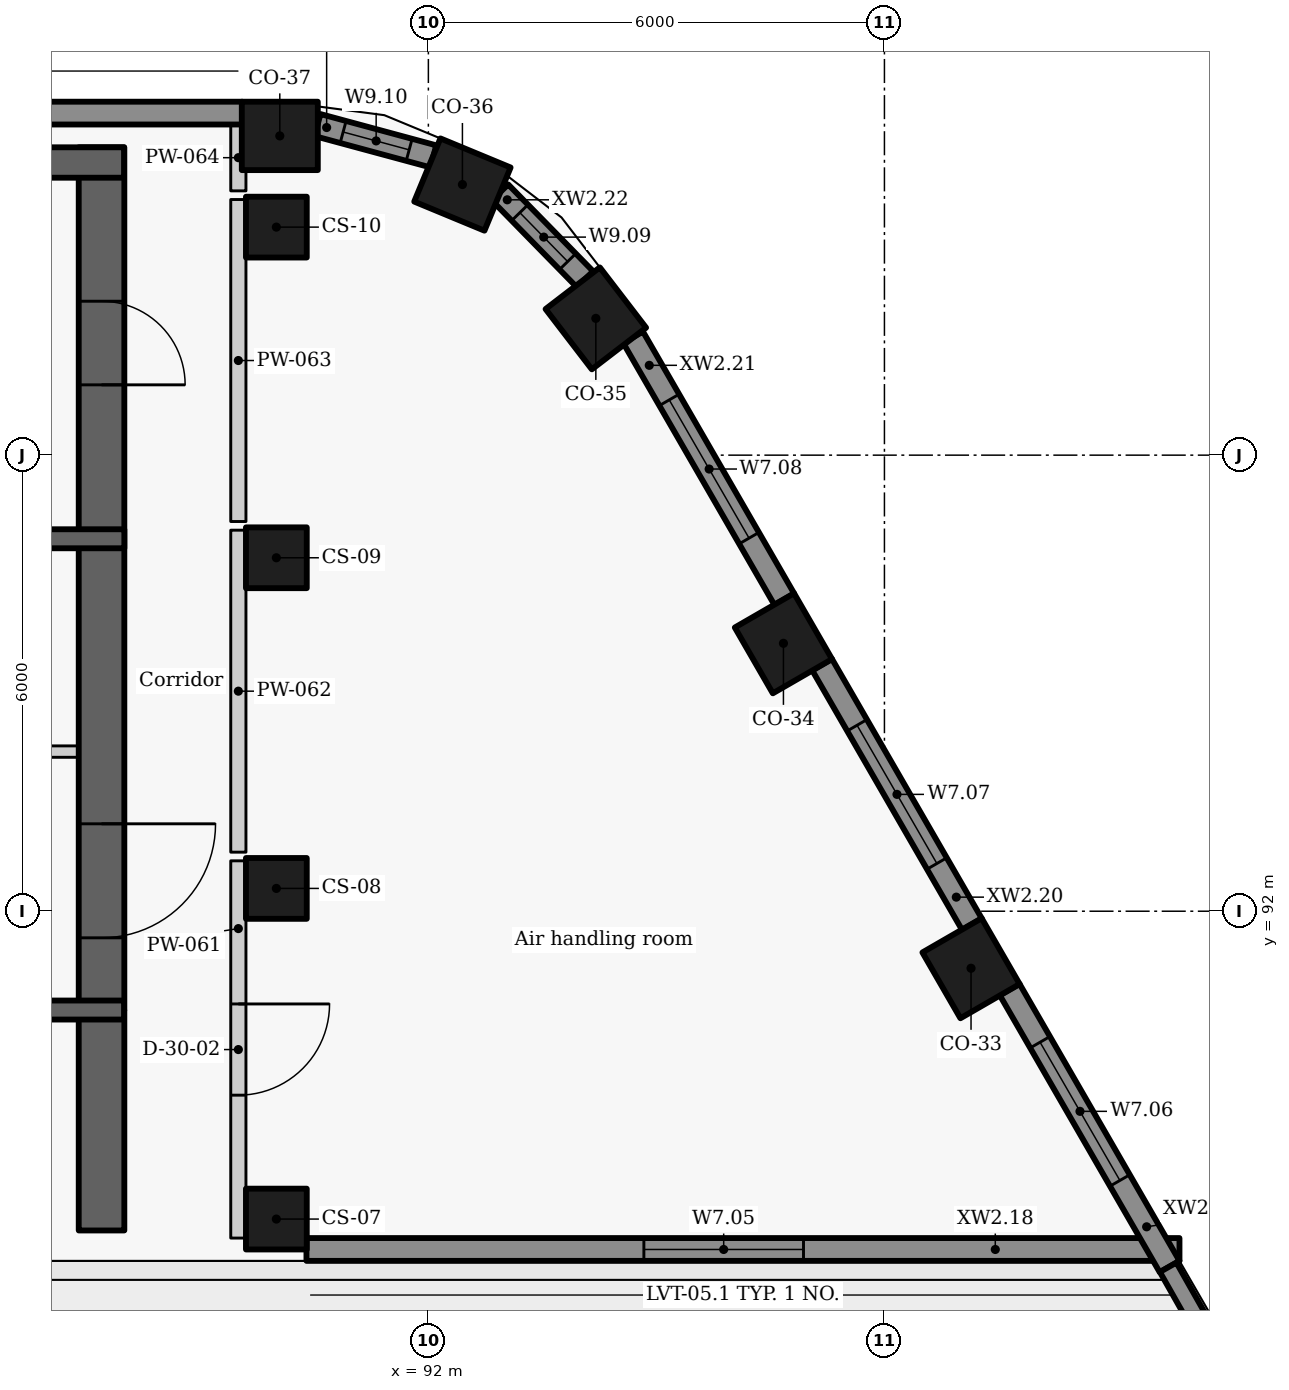
"""IFC4 building model, lengths in metres.
Left out: names, types, materials, properties, quantities, classifications, styles, units other than length and angle.
Written with IfcOpenShell. Run it as: python <this file> out.ifc"""

import sys

from ifc_helpers import new_model, si_unit, direction, frame, frame_2d, origin, origin_2d, place, context, subcontext, project, spatial, rectangle, extrude, element, fill, save


model = new_model("IFC4")
c1 = context("Model", 3, precision=1e-05, world=origin(), true_north=direction((0.0, 1.0)))
c2 = subcontext(c1, "Body", "Model", "MODEL_VIEW")
j1 = project(units=[si_unit("LENGTHUNIT", "METRE"), si_unit("PLANEANGLEUNIT", "RADIAN")], contexts=[c1])
p1 = place(None, origin())
s1 = spatial("IfcSite", under=j1, at=p1, CompositionType="ELEMENT")
p2 = place(p1, origin())
s2 = spatial("IfcBuilding", under=s1, at=p2, CompositionType="ELEMENT")
p3 = place(p2, frame((0.0, 0.0, 276.0)))
s3 = spatial("IfcBuildingStorey", under=s2, at=p3, CompositionType="ELEMENT", Elevation=276.0)
for number, where, z_axis, x_axis in (
    (1, (99.139, 91.25, 0.0), (0.0, 0.0, 1.0), (-0.5, 0.866, 0.0)),
    (2, (96.671, 95.525, 0.0), (0.0, 0.0, 1.0), (-0.5, 0.866, 0.0)),
    (3, (94.203, 99.8, 0.0), (0.0, 0.0, 1.0), (-0.609, 0.793, 0.0)),
    (4, (92.448, 101.56, 0.0), (0.0, 0.0, 1.0), (-0.924, 0.383, 0.0)),
    (5, (90.045, 102.2, 0.0), (0.0, 0.0, 1.0), (-1.0, 0.0, 0.0)),
):
    element("IfcColumn", number, at=place(p3, frame(where, z_axis=z_axis, x_axis=x_axis)), inside=s3, PredefinedType="COLUMN", context=c2, shape_type="SweptSolid", body=[
        extrude(rectangle(XDim=1.0, YDim=0.9, at=origin_2d()), origin(), (0.0, 0.0, 1.0), 3.6),
    ])
for number, where, z_axis, x_axis in (
    (6, (90.0, 87.95, 0.0), (0.0, 0.0, 1.0), (0.0, 1.0, 0.0)),
    (7, (90.0, 92.3, 0.0), (0.0, 0.0, 1.0), (0.0, 1.0, 0.0)),
    (8, (90.0, 96.65, 0.0), (0.0, 0.0, 1.0), (0.0, 1.0, 0.0)),
    (9, (90.0, 101.0, 0.0), (0.0, 0.0, 1.0), (0.0, 1.0, 0.0)),
):
    element("IfcColumn", number, at=place(p3, frame(where, z_axis=z_axis, x_axis=x_axis)), inside=s3, PredefinedType="COLUMN", context=c2, shape_type="SweptSolid", body=[
        extrude(rectangle(XDim=0.8, YDim=0.8, at=origin_2d()), origin(), (0.0, 0.0, 1.0), 3.6),
    ])
p4 = place(p3, frame((90.396, 87.55, 0.0), z_axis=(0.0, 0.0, 1.0), x_axis=(1.0, 0.0, 0.0)))
e10 = element("IfcWall", 10, at=p4, inside=s3, PredefinedType="SOLIDWALL", context=c2, shape_type="SweptSolid", body=[
    extrude(rectangle(XDim=11.486, YDim=0.3, at=frame_2d((5.743, 0.0))), origin(), (0.0, 0.0, 1.0), 2.725),
])
p5 = place(p4, frame((4.439, 0.0, 0.9)))
e11 = element("IfcOpeningElement", 11, at=p5, cuts=e10, PredefinedType="OPENING", context=c2, shape_type="SweptSolid", body=[
    extrude(rectangle(XDim=2.1, YDim=1.1, at=frame_2d((1.05, 0.55))), frame((0.0, 0.16, 0.0), z_axis=(0.0, -1.0, 0.0), x_axis=(1.0, 0.0, 0.0)), (0.0, 0.0, 1.0), 0.32),
])
p6 = place(p3, frame((101.752, 87.325, 0.0), z_axis=(0.0, 0.0, 1.0), x_axis=(-0.499981865284, 0.866035873614, 0.0)))
e12 = element("IfcWall", 12, at=p6, inside=s3, PredefinedType="SOLIDWALL", context=c2, shape_type="SweptSolid", body=[
    extrude(rectangle(XDim=4.209, YDim=0.3, at=frame_2d((2.104, 0.0))), origin(), (0.0, 0.0, 1.0), 2.725),
])
p7 = place(p6, frame((1.308, 0.0, 0.9)))
e13 = element("IfcOpeningElement", 13, at=p7, cuts=e12, PredefinedType="OPENING", context=c2, shape_type="SweptSolid", body=[
    extrude(rectangle(XDim=2.1, YDim=1.1, at=frame_2d((1.05, 0.55))), frame((0.0, 0.16, 0.0), z_axis=(0.0, -1.0, 0.0), x_axis=(1.0, 0.0, 0.0)), (0.0, 0.0, 1.0), 0.32),
])
p8 = place(p3, frame((99.151, 91.829, 0.0), z_axis=(0.0, 0.0, 1.0), x_axis=(-0.499986771468, 0.866033041146, 0.0)))
e14 = element("IfcWall", 14, at=p8, inside=s3, PredefinedType="SOLIDWALL", context=c2, shape_type="SweptSolid", body=[
    extrude(rectangle(XDim=3.944, YDim=0.3, at=frame_2d((1.972, 0.0))), origin(), (0.0, 0.0, 1.0), 2.725),
])
p9 = place(p8, frame((0.922, 0.0, 0.9)))
e15 = element("IfcOpeningElement", 15, at=p9, cuts=e14, PredefinedType="OPENING", context=c2, shape_type="SweptSolid", body=[
    extrude(rectangle(XDim=2.1, YDim=1.1, at=frame_2d((1.05, 0.55))), frame((0.0, 0.16, 0.0), z_axis=(0.0, -1.0, 0.0), x_axis=(1.0, 0.0, 0.0)), (0.0, 0.0, 1.0), 0.32),
])
p10 = place(p3, frame((96.683, 96.104, 0.0), z_axis=(0.0, 0.0, 1.0), x_axis=(-0.500005687176, 0.866022120267, 0.0)))
e16 = element("IfcWall", 16, at=p10, inside=s3, PredefinedType="SOLIDWALL", context=c2, shape_type="SweptSolid", body=[
    extrude(rectangle(XDim=3.979, YDim=0.3, at=frame_2d((1.99, 0.0))), origin(), (0.0, 0.0, 1.0), 2.725),
])
p11 = place(p10, frame((0.928, 0.0, 0.9)))
e17 = element("IfcOpeningElement", 17, at=p11, cuts=e16, PredefinedType="OPENING", context=c2, shape_type="SweptSolid", body=[
    extrude(rectangle(XDim=2.1, YDim=1.1, at=frame_2d((1.05, 0.55))), frame((0.0, 0.16, 0.0), z_axis=(0.0, -1.0, 0.0), x_axis=(1.0, 0.0, 0.0)), (0.0, 0.0, 1.0), 0.32),
])
p12 = place(p3, frame((94.06, 100.315, 0.0), z_axis=(0.0, 0.0, 1.0), x_axis=(-0.6992720923, 0.714855608449, 0.0)))
e18 = element("IfcWall", 18, at=p12, inside=s3, PredefinedType="SOLIDWALL", context=c2, shape_type="SweptSolid", body=[
    extrude(rectangle(XDim=1.598, YDim=0.3, at=frame_2d((0.799, 0.0))), origin(), (0.0, 0.0, 1.0), 2.725),
])
p13 = place(p12, frame((0.325, 0.0, 0.9)))
e19 = element("IfcOpeningElement", 19, at=p13, cuts=e18, PredefinedType="OPENING", context=c2, shape_type="SweptSolid", body=[
    extrude(rectangle(XDim=0.9, YDim=1.1, at=frame_2d((0.45, 0.55))), frame((0.0, 0.16, 0.0), z_axis=(0.0, -1.0, 0.0), x_axis=(1.0, 0.0, 0.0)), (0.0, 0.0, 1.0), 0.32),
])
p14 = place(p3, frame((92.065, 101.931, 0.0), z_axis=(0.0, 0.0, 1.0), x_axis=(-0.965371819036, 0.260877846914, 0.0)))
e20 = element("IfcWall", 20, at=p14, inside=s3, PredefinedType="SOLIDWALL", context=c2, shape_type="SweptSolid", body=[
    extrude(rectangle(XDim=1.578, YDim=0.3, at=frame_2d((0.789, 0.0))), origin(), (0.0, 0.0, 1.0), 2.725),
])
p15 = place(p14, frame((0.329, 0.0, 0.9)))
e21 = element("IfcOpeningElement", 21, at=p15, cuts=e20, PredefinedType="OPENING", context=c2, shape_type="SweptSolid", body=[
    extrude(rectangle(XDim=0.9, YDim=1.1, at=frame_2d((0.45, 0.55))), frame((0.0, 0.16, 0.0), z_axis=(0.0, -1.0, 0.0), x_axis=(1.0, 0.0, 0.0)), (0.0, 0.0, 1.0), 0.32),
])
p16 = place(p3, frame((89.549, 102.5, 0.0), z_axis=(0.0, 0.0, 1.0), x_axis=(-1.0, 0.0, 0.0)))
e22 = element("IfcWall", 22, at=p16, inside=s3, PredefinedType="SOLIDWALL", context=c2, shape_type="SweptSolid", body=[
    extrude(rectangle(XDim=19.134, YDim=0.3, at=frame_2d((9.567, 0.0))), origin(), (0.0, 0.0, 1.0), 2.725),
])
p17 = place(p3, frame((104.649, 82.166, 0.0), z_axis=(0.0, 0.0, 1.0), x_axis=(-0.492736734633, 0.870178435922, 0.0)))
e23 = element("IfcWall", 23, at=p17, inside=s3, PredefinedType="PARAPET", context=c2, shape_type="SweptSolid", body=[
    extrude(rectangle(XDim=5.918, YDim=0.25, at=frame_2d((2.959, 0.0))), origin(), (0.0, 0.0, 1.0), 1.1),
])
p18 = place(p3, frame((85.397, 94.1, 0.0), z_axis=(0.0, 0.0, 1.0), x_axis=(1.0, 0.0, 0.0)))
e24 = element("IfcWall", 24, at=p18, inside=s3, PredefinedType="PARTITIONING", context=c2, shape_type="SweptSolid", body=[
    extrude(rectangle(XDim=2.603, YDim=0.15, at=frame_2d((1.302, 0.0))), origin(), (0.0, 0.0, 1.0), 3.325),
])
p19 = place(p18, frame((0.528, 0.0, 0.0)))
e25 = element("IfcOpeningElement", 25, at=p19, cuts=e24, PredefinedType="OPENING", context=c2, shape_type="SweptSolid", body=[
    extrude(rectangle(XDim=0.9, YDim=2.1, at=frame_2d((0.45, 1.05))), frame((0.0, 0.085, 0.0), z_axis=(0.0, -1.0, 0.0), x_axis=(1.0, 0.0, 0.0)), (0.0, 0.0, 1.0), 0.17),
])
p20 = place(p3, frame((87.7, 102.05, -0.275), z_axis=(0.0, 0.0, 1.0), x_axis=(0.0, -1.0, 0.0)))
e26 = element("IfcWall", 26, at=p20, inside=s3, PredefinedType="SHEAR", context=c2, shape_type="SweptSolid", body=[
    extrude(rectangle(XDim=11.35, YDim=0.6, at=frame_2d((5.675, 0.0))), origin(), (0.0, 0.0, 1.0), 3.6),
])
p21 = place(p20, frame((8.9, 0.0, 0.275)))
e27 = element("IfcOpeningElement", 27, at=p21, cuts=e26, PredefinedType="OPENING", context=c2, shape_type="SweptSolid", body=[
    extrude(rectangle(XDim=1.5, YDim=2.1, at=frame_2d((0.75, 1.05))), frame((0.0, 0.31, 0.0), z_axis=(0.0, -1.0, 0.0), x_axis=(1.0, 0.0, 0.0)), (0.0, 0.0, 1.0), 0.62),
])
p22 = place(p20, frame((2.025, 0.0, 0.275)))
e28 = element("IfcOpeningElement", 28, at=p22, cuts=e26, PredefinedType="OPENING", context=c2, shape_type="SweptSolid", body=[
    extrude(rectangle(XDim=1.1, YDim=2.1, at=frame_2d((0.55, 1.05))), frame((0.0, 0.31, 0.0), z_axis=(0.0, -1.0, 0.0), x_axis=(1.0, 0.0, 0.0)), (0.0, 0.0, 1.0), 0.62),
])
p23 = place(p3, frame((80.547, 96.9, -0.275), z_axis=(0.0, 0.0, 1.0), x_axis=(1.0, 0.0, 0.0)))
e29 = element("IfcWall", 29, at=p23, inside=s3, PredefinedType="SHEAR", context=c2, shape_type="SweptSolid", body=[
    extrude(rectangle(XDim=7.453, YDim=0.25, at=frame_2d((3.727, 0.0))), origin(), (0.0, 0.0, 1.0), 3.6),
])
p24 = place(p23, frame((3.302, 0.0, 0.275)))
e30 = element("IfcOpeningElement", 30, at=p24, cuts=e29, PredefinedType="OPENING", context=c2, shape_type="SweptSolid", body=[
    extrude(rectangle(XDim=1.1, YDim=2.1, at=frame_2d((0.55, 1.05))), frame((0.0, 0.135, 0.0), z_axis=(0.0, -1.0, 0.0), x_axis=(1.0, 0.0, 0.0)), (0.0, 0.0, 1.0), 0.27),
])
p25 = place(p3, frame((89.5, 92.663, 0.0), z_axis=(0.0, 0.0, 1.0), x_axis=(0.0, -1.0, 0.0)))
e31 = element("IfcWall", 31, at=p25, inside=s3, PredefinedType="PARTITIONING", context=c2, shape_type="SweptSolid", body=[
    extrude(rectangle(XDim=4.963, YDim=0.2, at=frame_2d((2.481, 0.0))), origin(), (0.0, 0.0, 1.0), 3.325),
])
p26 = place(p25, frame((1.883, 0.0, 0.0)))
e32 = element("IfcOpeningElement", 32, at=p26, cuts=e31, PredefinedType="OPENING", context=c2, shape_type="SweptSolid", body=[
    extrude(rectangle(XDim=1.2, YDim=2.1, at=frame_2d((0.6, 1.05))), frame((0.0, 0.11, 0.0), z_axis=(0.0, -1.0, 0.0), x_axis=(1.0, 0.0, 0.0)), (0.0, 0.0, 1.0), 0.22),
])
p27 = place(p3, frame((89.5, 92.777, 0.0), z_axis=(0.0, 0.0, 1.0), x_axis=(0.0, 1.0, 0.0)))
e33 = element("IfcWall", 33, at=p27, inside=s3, PredefinedType="PARTITIONING", context=c2, shape_type="SweptSolid", body=[
    extrude(rectangle(XDim=4.236, YDim=0.2, at=frame_2d((2.118, 0.0))), origin(), (0.0, 0.0, 1.0), 3.325),
])
p28 = place(p3, frame((89.5, 97.127, 0.0), z_axis=(0.0, 0.0, 1.0), x_axis=(0.0, 1.0, 0.0)))
e34 = element("IfcWall", 34, at=p28, inside=s3, PredefinedType="PARTITIONING", context=c2, shape_type="SweptSolid", body=[
    extrude(rectangle(XDim=4.236, YDim=0.2, at=frame_2d((2.118, 0.0))), origin(), (0.0, 0.0, 1.0), 3.325),
])
p29 = place(p3, frame((89.5, 101.477, 0.0), z_axis=(0.0, 0.0, 1.0), x_axis=(0.0, 1.0, 0.0)))
e35 = element("IfcWall", 35, at=p29, inside=s3, PredefinedType="PARTITIONING", context=c2, shape_type="SweptSolid", body=[
    extrude(rectangle(XDim=0.873, YDim=0.2, at=frame_2d((0.437, 0.0))), origin(), (0.0, 0.0, 1.0), 3.325),
])
p30 = place(p3, frame((87.7, 87.8, -0.275), z_axis=(0.0, 0.0, 1.0), x_axis=(0.0, 1.0, 0.0)))
e36 = element("IfcWall", 36, at=p30, inside=s3, PredefinedType="SHEAR", context=c2, shape_type="SweptSolid", body=[
    extrude(rectangle(XDim=2.896, YDim=0.6, at=frame_2d((1.448, 0.0))), origin(), (0.0, 0.0, 1.0), 3.6),
])
p31 = place(p3, frame((85.404, 90.7, -0.275), z_axis=(0.0, 0.0, 1.0), x_axis=(1.0, 0.0, 0.0)))
e37 = element("IfcWall", 37, at=p31, inside=s3, PredefinedType="SHEAR", context=c2, shape_type="SweptSolid", body=[
    extrude(rectangle(XDim=2.592, YDim=0.25, at=frame_2d((1.296, 0.0))), origin(), (0.0, 0.0, 1.0), 3.6),
])
p32 = place(p3, frame((72.004, 101.85, -0.275), z_axis=(0.0, 0.0, 1.0), x_axis=(1.0, 0.0, 0.0)))
e38 = element("IfcWall", 38, at=p32, inside=s3, PredefinedType="SHEAR", context=c2, shape_type="SweptSolid", body=[
    extrude(rectangle(XDim=15.992, YDim=0.4, at=frame_2d((7.996, 0.0))), origin(), (0.0, 0.0, 1.0), 3.6),
])
p33 = place(p5, origin())
e39 = element("IfcWindow", 39, at=p33, inside=s3, PartitioningType="SINGLE_PANEL", PredefinedType="WINDOW", context=c2, shape_type="SweptSolid", body=[
    extrude(rectangle(XDim=2.1, YDim=1.1, at=frame_2d((1.05, 0.55))), frame((0.0, 0.03, 0.0), z_axis=(0.0, -1.0, 0.0), x_axis=(1.0, 0.0, 0.0)), (0.0, 0.0, 1.0), 0.06),
])
fill(e11, e39)
p34 = place(p7, origin())
e40 = element("IfcWindow", 40, at=p34, inside=s3, PartitioningType="SINGLE_PANEL", PredefinedType="WINDOW", context=c2, shape_type="SweptSolid", body=[
    extrude(rectangle(XDim=2.1, YDim=1.1, at=frame_2d((1.05, 0.55))), frame((0.0, 0.03, 0.0), z_axis=(0.0, -1.0, 0.0), x_axis=(1.0, 0.0, 0.0)), (0.0, 0.0, 1.0), 0.06),
])
fill(e13, e40)
p35 = place(p9, origin())
e41 = element("IfcWindow", 41, at=p35, inside=s3, PartitioningType="SINGLE_PANEL", PredefinedType="WINDOW", context=c2, shape_type="SweptSolid", body=[
    extrude(rectangle(XDim=2.1, YDim=1.1, at=frame_2d((1.05, 0.55))), frame((0.0, 0.03, 0.0), z_axis=(0.0, -1.0, 0.0), x_axis=(1.0, 0.0, 0.0)), (0.0, 0.0, 1.0), 0.06),
])
fill(e15, e41)
p36 = place(p11, origin())
e42 = element("IfcWindow", 42, at=p36, inside=s3, PartitioningType="SINGLE_PANEL", PredefinedType="WINDOW", context=c2, shape_type="SweptSolid", body=[
    extrude(rectangle(XDim=2.1, YDim=1.1, at=frame_2d((1.05, 0.55))), frame((0.0, 0.03, 0.0), z_axis=(0.0, -1.0, 0.0), x_axis=(1.0, 0.0, 0.0)), (0.0, 0.0, 1.0), 0.06),
])
fill(e17, e42)
p37 = place(p13, origin())
e43 = element("IfcWindow", 43, at=p37, inside=s3, PartitioningType="SINGLE_PANEL", PredefinedType="WINDOW", context=c2, shape_type="SweptSolid", body=[
    extrude(rectangle(XDim=0.9, YDim=1.1, at=frame_2d((0.45, 0.55))), frame((0.0, 0.03, 0.0), z_axis=(0.0, -1.0, 0.0), x_axis=(1.0, 0.0, 0.0)), (0.0, 0.0, 1.0), 0.06),
])
fill(e19, e43)
p38 = place(p15, origin())
e44 = element("IfcWindow", 44, at=p38, inside=s3, PartitioningType="SINGLE_PANEL", PredefinedType="WINDOW", context=c2, shape_type="SweptSolid", body=[
    extrude(rectangle(XDim=0.9, YDim=1.1, at=frame_2d((0.45, 0.55))), frame((0.0, 0.03, 0.0), z_axis=(0.0, -1.0, 0.0), x_axis=(1.0, 0.0, 0.0)), (0.0, 0.0, 1.0), 0.06),
])
fill(e21, e44)
p39 = place(p26, origin())
e45 = element("IfcDoor", 45, at=p39, inside=s3, OperationType="SINGLE_SWING_LEFT", PredefinedType="DOOR", context=c2, shape_type="SweptSolid", body=[
    extrude(rectangle(XDim=1.2, YDim=2.1, at=frame_2d((0.6, 1.05))), frame((0.0, 0.025, 0.0), z_axis=(0.0, -1.0, 0.0), x_axis=(1.0, 0.0, 0.0)), (0.0, 0.0, 1.0), 0.05),
])
fill(e32, e45)
p40 = place(p21, origin())
e46 = element("IfcDoor", 46, at=p40, inside=s3, OperationType="DOUBLE_DOOR_SINGLE_SWING", PredefinedType="DOOR", context=c2, shape_type="SweptSolid", body=[
    extrude(rectangle(XDim=1.5, YDim=2.1, at=frame_2d((0.75, 1.05))), frame((0.0, 0.025, 0.0), z_axis=(0.0, -1.0, 0.0), x_axis=(1.0, 0.0, 0.0)), (0.0, 0.0, 1.0), 0.05),
])
fill(e27, e46)
p41 = place(p22, origin())
e47 = element("IfcDoor", 47, at=p41, inside=s3, OperationType="SINGLE_SWING_RIGHT", PredefinedType="DOOR", context=c2, shape_type="SweptSolid", body=[
    extrude(rectangle(XDim=1.1, YDim=2.1, at=frame_2d((0.55, 1.05))), frame((0.0, 0.025, 0.0), z_axis=(0.0, -1.0, 0.0), x_axis=(1.0, 0.0, 0.0)), (0.0, 0.0, 1.0), 0.05),
])
fill(e28, e47)
save(model, sys.argv[1])
